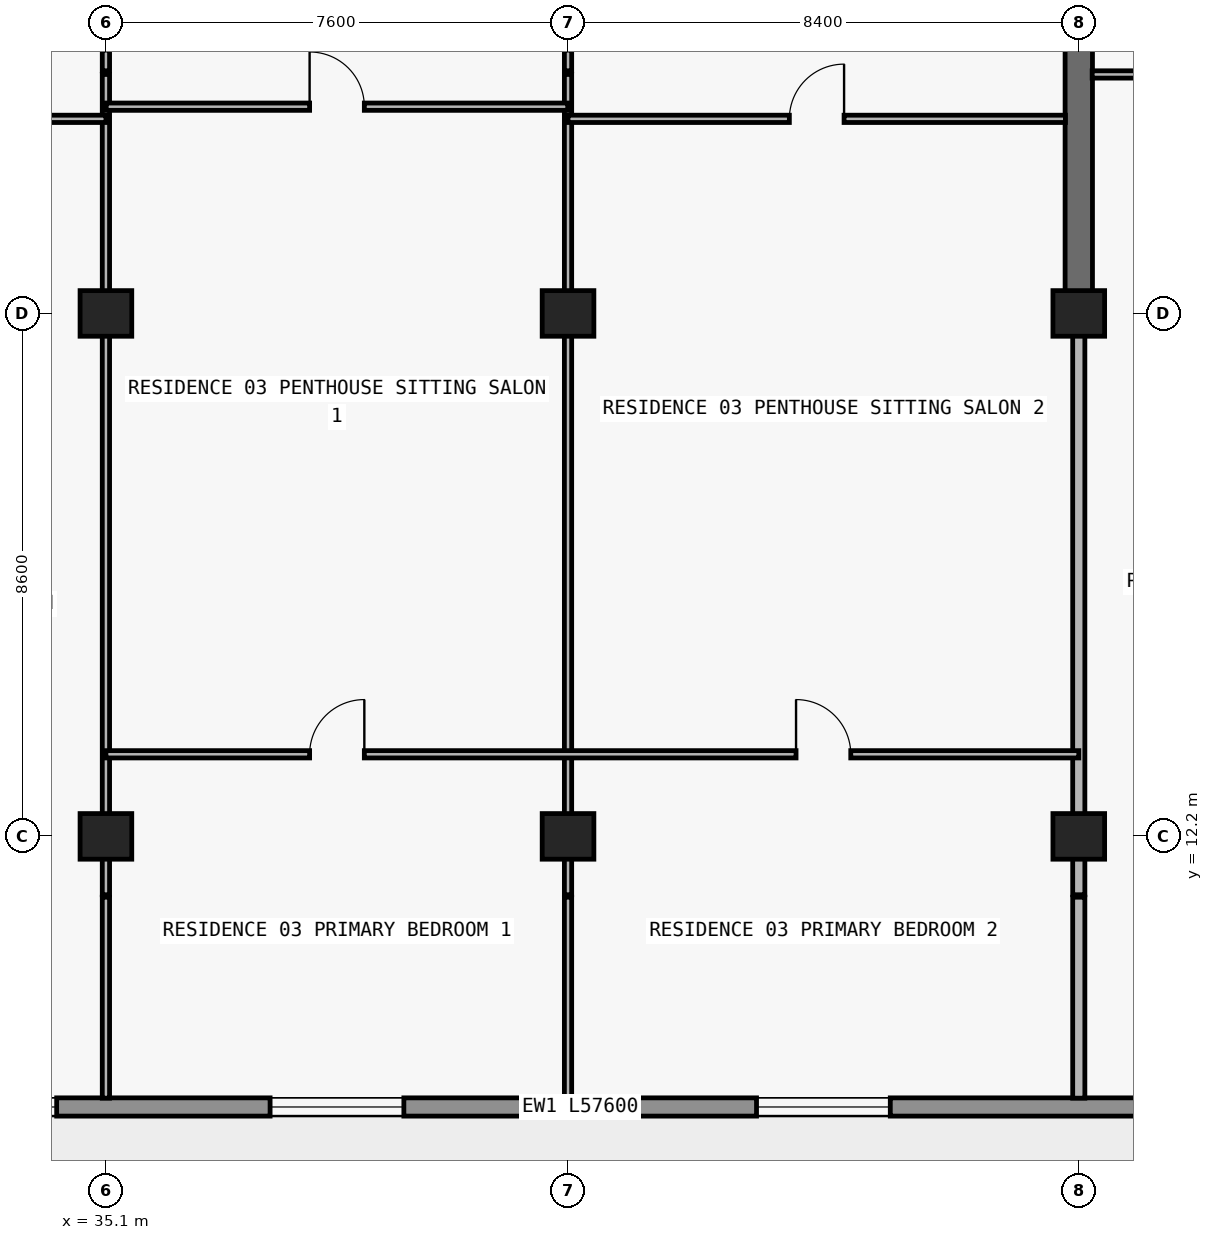
"""IFC4 building model, lengths in metres.
Left out: names, types, materials, properties, quantities, classifications, styles, units other than length and angle.
Written with IfcOpenShell. Run it as: python <this file> out.ifc"""

import sys

from ifc_helpers import new_model, si_unit, direction, frame, frame_2d, origin, origin_2d, place, context, subcontext, project, spatial, rectangle, extrude, element, fill, save


model = new_model("IFC4")
c1 = context("Model", 3, precision=1e-05, world=origin(), true_north=direction((0.0, 1.0)))
c2 = subcontext(c1, "Body", "Model", "MODEL_VIEW")
j1 = project(units=[si_unit("LENGTHUNIT", "METRE"), si_unit("PLANEANGLEUNIT", "RADIAN")], contexts=[c1])
p1 = place(None, origin())
s1 = spatial("IfcSite", under=j1, at=p1, CompositionType="ELEMENT")
p2 = place(p1, origin())
s2 = spatial("IfcBuilding", under=s1, at=p2, CompositionType="ELEMENT")
p3 = place(p2, frame((0.0, 0.0, 173.7)))
s3 = spatial("IfcBuildingStorey", under=s2, at=p3, CompositionType="ELEMENT", Elevation=173.7)
for number, where, z_axis, x_axis in (
    (1, (35.1, 12.2, 0.0), (0.0, 0.0, 1.0), (1.0, 0.0, 0.0)),
    (2, (42.7, 12.2, 0.0), (0.0, 0.0, 1.0), (1.0, 0.0, 0.0)),
    (3, (51.1, 12.2, 0.0), (0.0, 0.0, 1.0), (1.0, 0.0, 0.0)),
    (4, (35.1, 20.8, 0.0), (0.0, 0.0, 1.0), (1.0, 0.0, 0.0)),
    (5, (42.7, 20.8, 0.0), (0.0, 0.0, 1.0), (1.0, 0.0, 0.0)),
    (6, (51.1, 20.8, 0.0), (0.0, 0.0, 1.0), (1.0, 0.0, 0.0)),
):
    element("IfcColumn", number, at=place(p3, frame(where, z_axis=z_axis, x_axis=x_axis)), inside=s3, PredefinedType="COLUMN", context=c2, shape_type="SweptSolid", body=[
        extrude(rectangle(XDim=0.85, YDim=0.75, at=origin_2d()), origin(), (0.0, 0.0, 1.0), 3.05),
    ])
p4 = place(p3, frame((51.1, 20.8, 0.0), z_axis=(0.0, 0.0, 1.0), x_axis=(0.0, 1.0, 0.0)))
e7 = element("IfcWall", 7, at=p4, inside=s3, PredefinedType="SHEAR", context=c2, shape_type="SweptSolid", body=[
    extrude(rectangle(XDim=8.6, YDim=0.45, at=frame_2d((4.3, 0.0))), origin(), (0.0, 0.0, 1.0), 3.05),
])
p5 = place(p3, frame((67.7, 7.75, 0.0), z_axis=(0.0, 0.0, 1.0), x_axis=(-1.0, 0.0, 0.0)))
e8 = element("IfcWall", 8, at=p5, inside=s3, PredefinedType="STANDARD", context=c2, shape_type="SweptSolid", body=[
    extrude(rectangle(XDim=57.6, YDim=0.3, at=frame_2d((28.8, 0.0))), origin(), (0.0, 0.0, 1.0), 3.05),
])
p6 = place(p5, frame((54.673, 0.0, 0.0)))
e9 = element("IfcOpeningElement", 9, at=p6, cuts=e8, PredefinedType="OPENING", context=c2, shape_type="SweptSolid", body=[
    extrude(rectangle(XDim=2.0, YDim=2.3, at=frame_2d((1.0, 1.15))), frame((0.0, 0.16, 0.0), z_axis=(0.0, -1.0, 0.0), x_axis=(1.0, 0.0, 0.0)), (0.0, 0.0, 1.0), 0.32),
])
p7 = place(p5, frame((50.473, 0.0, 0.85)))
e10 = element("IfcOpeningElement", 10, at=p7, cuts=e8, PredefinedType="OPENING", context=c2, shape_type="SweptSolid", body=[
    extrude(rectangle(XDim=2.2, YDim=1.55, at=frame_2d((1.1, 0.775))), frame((0.0, 0.16, 0.0), z_axis=(0.0, -1.0, 0.0), x_axis=(1.0, 0.0, 0.0)), (0.0, 0.0, 1.0), 0.32),
])
p8 = place(p5, frame((46.09, 0.0, 0.0)))
e11 = element("IfcOpeningElement", 11, at=p8, cuts=e8, PredefinedType="OPENING", context=c2, shape_type="SweptSolid", body=[
    extrude(rectangle(XDim=2.0, YDim=2.3, at=frame_2d((1.0, 1.15))), frame((0.0, 0.16, 0.0), z_axis=(0.0, -1.0, 0.0), x_axis=(1.0, 0.0, 0.0)), (0.0, 0.0, 1.0), 0.32),
])
p9 = place(p5, frame((41.99, 0.0, 0.85)))
e12 = element("IfcOpeningElement", 12, at=p9, cuts=e8, PredefinedType="OPENING", context=c2, shape_type="SweptSolid", body=[
    extrude(rectangle(XDim=1.8, YDim=1.55, at=frame_2d((0.9, 0.775))), frame((0.0, 0.16, 0.0), z_axis=(0.0, -1.0, 0.0), x_axis=(1.0, 0.0, 0.0)), (0.0, 0.0, 1.0), 0.32),
])
p10 = place(p5, frame((38.09, 0.0, 0.0)))
e13 = element("IfcOpeningElement", 13, at=p10, cuts=e8, PredefinedType="OPENING", context=c2, shape_type="SweptSolid", body=[
    extrude(rectangle(XDim=2.0, YDim=2.3, at=frame_2d((1.0, 1.15))), frame((0.0, 0.16, 0.0), z_axis=(0.0, -1.0, 0.0), x_axis=(1.0, 0.0, 0.0)), (0.0, 0.0, 1.0), 0.32),
])
p11 = place(p5, frame((33.41, 0.0, 0.65)))
e14 = element("IfcOpeningElement", 14, at=p11, cuts=e8, PredefinedType="OPENING", context=c2, shape_type="SweptSolid", body=[
    extrude(rectangle(XDim=2.6, YDim=1.85, at=frame_2d((1.3, 0.925))), frame((0.0, 0.16, 0.0), z_axis=(0.0, -1.0, 0.0), x_axis=(1.0, 0.0, 0.0)), (0.0, 0.0, 1.0), 0.32),
])
p12 = place(p5, frame((27.7, 0.0, 0.85)))
e15 = element("IfcOpeningElement", 15, at=p12, cuts=e8, PredefinedType="OPENING", context=c2, shape_type="SweptSolid", body=[
    extrude(rectangle(XDim=2.2, YDim=1.55, at=frame_2d((1.1, 0.775))), frame((0.0, 0.16, 0.0), z_axis=(0.0, -1.0, 0.0), x_axis=(1.0, 0.0, 0.0)), (0.0, 0.0, 1.0), 0.32),
])
p13 = place(p5, frame((19.7, 0.0, 0.85)))
e16 = element("IfcOpeningElement", 16, at=p13, cuts=e8, PredefinedType="OPENING", context=c2, shape_type="SweptSolid", body=[
    extrude(rectangle(XDim=2.2, YDim=1.55, at=frame_2d((1.1, 0.775))), frame((0.0, 0.16, 0.0), z_axis=(0.0, -1.0, 0.0), x_axis=(1.0, 0.0, 0.0)), (0.0, 0.0, 1.0), 0.32),
])
p14 = place(p5, frame((13.29, 0.0, 0.0)))
e17 = element("IfcOpeningElement", 17, at=p14, cuts=e8, PredefinedType="OPENING", context=c2, shape_type="SweptSolid", body=[
    extrude(rectangle(XDim=2.0, YDim=2.3, at=frame_2d((1.0, 1.15))), frame((0.0, 0.16, 0.0), z_axis=(0.0, -1.0, 0.0), x_axis=(1.0, 0.0, 0.0)), (0.0, 0.0, 1.0), 0.32),
])
p15 = place(p5, frame((9.19, 0.0, 0.85)))
e18 = element("IfcOpeningElement", 18, at=p15, cuts=e8, PredefinedType="OPENING", context=c2, shape_type="SweptSolid", body=[
    extrude(rectangle(XDim=1.8, YDim=1.55, at=frame_2d((0.9, 0.775))), frame((0.0, 0.16, 0.0), z_axis=(0.0, -1.0, 0.0), x_axis=(1.0, 0.0, 0.0)), (0.0, 0.0, 1.0), 0.32),
])
p16 = place(p5, frame((5.273, 0.0, 0.0)))
e19 = element("IfcOpeningElement", 19, at=p16, cuts=e8, PredefinedType="OPENING", context=c2, shape_type="SweptSolid", body=[
    extrude(rectangle(XDim=2.0, YDim=2.3, at=frame_2d((1.0, 1.15))), frame((0.0, 0.16, 0.0), z_axis=(0.0, -1.0, 0.0), x_axis=(1.0, 0.0, 0.0)), (0.0, 0.0, 1.0), 0.32),
])
p17 = place(p5, frame((1.073, 0.0, 0.85)))
e20 = element("IfcOpeningElement", 20, at=p17, cuts=e8, PredefinedType="OPENING", context=c2, shape_type="SweptSolid", body=[
    extrude(rectangle(XDim=2.2, YDim=1.55, at=frame_2d((1.1, 0.775))), frame((0.0, 0.16, 0.0), z_axis=(0.0, -1.0, 0.0), x_axis=(1.0, 0.0, 0.0)), (0.0, 0.0, 1.0), 0.32),
])
p18 = place(p3, frame((35.1, 7.895, 0.0), z_axis=(0.0, 0.0, 1.0), x_axis=(0.0, 1.0, 0.0)))
e21 = element("IfcWall", 21, at=p18, inside=s3, PredefinedType="PARTITIONING", context=c2, shape_type="SweptSolid", body=[
    extrude(rectangle(XDim=3.305, YDim=0.12, at=frame_2d((1.652, 0.0))), origin(), (0.0, 0.0, 1.0), 3.05),
])
p19 = place(p3, frame((35.1, 11.24, 0.0), z_axis=(0.0, 0.0, 1.0), x_axis=(0.0, 1.0, 0.0)))
e22 = element("IfcWall", 22, at=p19, inside=s3, PredefinedType="PARTITIONING", context=c2, shape_type="SweptSolid", body=[
    extrude(rectangle(XDim=13.49, YDim=0.12, at=frame_2d((6.745, 0.0))), origin(), (0.0, 0.0, 1.0), 2.263),
])
p20 = place(p3, frame((35.1, 24.79, 0.0), z_axis=(0.0, 0.0, 1.0), x_axis=(0.0, 1.0, 0.0)))
e23 = element("IfcWall", 23, at=p20, inside=s3, PredefinedType="PARTITIONING", context=c2, shape_type="SweptSolid", body=[
    extrude(rectangle(XDim=0.34, YDim=0.12, at=frame_2d((0.17, 0.0))), origin(), (0.0, 0.0, 1.0), 2.263),
])
p21 = place(p3, frame((42.7, 7.895, 0.0), z_axis=(0.0, 0.0, 1.0), x_axis=(0.0, 1.0, 0.0)))
e24 = element("IfcWall", 24, at=p21, inside=s3, PredefinedType="PARTITIONING", context=c2, shape_type="SweptSolid", body=[
    extrude(rectangle(XDim=3.305, YDim=0.12, at=frame_2d((1.652, 0.0))), origin(), (0.0, 0.0, 1.0), 3.05),
])
p22 = place(p3, frame((42.7, 11.24, 0.0), z_axis=(0.0, 0.0, 1.0), x_axis=(0.0, 1.0, 0.0)))
e25 = element("IfcWall", 25, at=p22, inside=s3, PredefinedType="PARTITIONING", context=c2, shape_type="SweptSolid", body=[
    extrude(rectangle(XDim=13.49, YDim=0.12, at=frame_2d((6.745, 0.0))), origin(), (0.0, 0.0, 1.0), 2.263),
])
p23 = place(p3, frame((42.7, 24.79, 0.0), z_axis=(0.0, 0.0, 1.0), x_axis=(0.0, 1.0, 0.0)))
e26 = element("IfcWall", 26, at=p23, inside=s3, PredefinedType="PARTITIONING", context=c2, shape_type="SweptSolid", body=[
    extrude(rectangle(XDim=0.34, YDim=0.12, at=frame_2d((0.17, 0.0))), origin(), (0.0, 0.0, 1.0), 2.263),
])
p24 = place(p3, frame((51.1, 7.895, 0.0), z_axis=(0.0, 0.0, 1.0), x_axis=(0.0, 1.0, 0.0)))
e27 = element("IfcWall", 27, at=p24, inside=s3, PredefinedType="PARTITIONING", context=c2, shape_type="SweptSolid", body=[
    extrude(rectangle(XDim=3.305, YDim=0.2, at=frame_2d((1.652, 0.0))), origin(), (0.0, 0.0, 1.0), 3.05),
])
p25 = place(p3, frame((51.1, 11.24, 0.0), z_axis=(0.0, 0.0, 1.0), x_axis=(0.0, 1.0, 0.0)))
e28 = element("IfcWall", 28, at=p25, inside=s3, PredefinedType="PARTITIONING", context=c2, shape_type="SweptSolid", body=[
    extrude(rectangle(XDim=9.555, YDim=0.2, at=frame_2d((4.777, 0.0))), origin(), (0.0, 0.0, 1.0), 2.263),
])
p26 = place(p3, frame((35.1, 13.55, 0.0), z_axis=(0.0, 0.0, 1.0), x_axis=(1.0, 0.0, 0.0)))
e29 = element("IfcWall", 29, at=p26, inside=s3, PredefinedType="PARTITIONING", context=c2, shape_type="SweptSolid", body=[
    extrude(rectangle(XDim=16.0, YDim=0.12, at=frame_2d((8.0, 0.0))), origin(), (0.0, 0.0, 1.0), 3.05),
])
p27 = place(p26, frame((3.35, 0.0, 0.0)))
e30 = element("IfcOpeningElement", 30, at=p27, cuts=e29, PredefinedType="OPENING", context=c2, shape_type="SweptSolid", body=[
    extrude(rectangle(XDim=0.9, YDim=2.15, at=frame_2d((0.45, 1.075))), frame((0.0, 0.07, 0.0), z_axis=(0.0, -1.0, 0.0), x_axis=(1.0, 0.0, 0.0)), (0.0, 0.0, 1.0), 0.14),
])
p28 = place(p26, frame((11.35, 0.0, 0.0)))
e31 = element("IfcOpeningElement", 31, at=p28, cuts=e29, PredefinedType="OPENING", context=c2, shape_type="SweptSolid", body=[
    extrude(rectangle(XDim=0.9, YDim=2.15, at=frame_2d((0.45, 1.075))), frame((0.0, 0.07, 0.0), z_axis=(0.0, -1.0, 0.0), x_axis=(1.0, 0.0, 0.0)), (0.0, 0.0, 1.0), 0.14),
])
p29 = place(p3, frame((26.92, 24.0, 0.0), z_axis=(0.0, 0.0, 1.0), x_axis=(1.0, 0.0, 0.0)))
e32 = element("IfcWall", 32, at=p29, inside=s3, PredefinedType="PARTITIONING", context=c2, shape_type="SweptSolid", body=[
    extrude(rectangle(XDim=8.18, YDim=0.12, at=frame_2d((4.09, 0.0))), origin(), (0.0, 0.0, 1.0), 3.05),
])
p30 = place(p29, frame((1.33, 0.0, 0.0)))
e33 = element("IfcOpeningElement", 33, at=p30, cuts=e32, PredefinedType="OPENING", context=c2, shape_type="SweptSolid", body=[
    extrude(rectangle(XDim=0.9, YDim=2.15, at=frame_2d((0.45, 1.075))), frame((0.0, 0.07, 0.0), z_axis=(0.0, -1.0, 0.0), x_axis=(1.0, 0.0, 0.0)), (0.0, 0.0, 1.0), 0.14),
])
p31 = place(p3, frame((42.7, 24.0, 0.0), z_axis=(0.0, 0.0, 1.0), x_axis=(1.0, 0.0, 0.0)))
e34 = element("IfcWall", 34, at=p31, inside=s3, PredefinedType="PARTITIONING", context=c2, shape_type="SweptSolid", body=[
    extrude(rectangle(XDim=8.18, YDim=0.12, at=frame_2d((4.09, 0.0))), origin(), (0.0, 0.0, 1.0), 3.05),
])
p32 = place(p31, frame((3.64, 0.0, 0.0)))
e35 = element("IfcOpeningElement", 35, at=p32, cuts=e34, PredefinedType="OPENING", context=c2, shape_type="SweptSolid", body=[
    extrude(rectangle(XDim=0.9, YDim=2.15, at=frame_2d((0.45, 1.075))), frame((0.0, 0.07, 0.0), z_axis=(0.0, -1.0, 0.0), x_axis=(1.0, 0.0, 0.0)), (0.0, 0.0, 1.0), 0.14),
])
p33 = place(p3, frame((35.105, 24.2, 0.0), z_axis=(0.0, 0.0, 1.0), x_axis=(1.0, 0.0, 0.0)))
e36 = element("IfcWall", 36, at=p33, inside=s3, PredefinedType="PARTITIONING", context=c2, shape_type="SweptSolid", body=[
    extrude(rectangle(XDim=7.59, YDim=0.12, at=frame_2d((3.795, 0.0))), origin(), (0.0, 0.0, 1.0), 3.05),
])
p34 = place(p33, frame((3.345, 0.0, 0.0)))
e37 = element("IfcOpeningElement", 37, at=p34, cuts=e36, PredefinedType="OPENING", context=c2, shape_type="SweptSolid", body=[
    extrude(rectangle(XDim=0.9, YDim=2.15, at=frame_2d((0.45, 1.075))), frame((0.0, 0.07, 0.0), z_axis=(0.0, -1.0, 0.0), x_axis=(1.0, 0.0, 0.0)), (0.0, 0.0, 1.0), 0.14),
])
p35 = place(p3, frame((51.32, 24.73, 0.0), z_axis=(0.0, 0.0, 1.0), x_axis=(1.0, 0.0, 0.0)))
e38 = element("IfcWall", 38, at=p35, inside=s3, PredefinedType="PARTITIONING", context=c2, shape_type="SweptSolid", body=[
    extrude(rectangle(XDim=8.18, YDim=0.12, at=frame_2d((4.09, 0.0))), origin(), (0.0, 0.0, 1.0), 3.05),
])
p36 = place(p35, frame((1.583, 0.0, 0.0)))
e39 = element("IfcOpeningElement", 39, at=p36, cuts=e38, PredefinedType="OPENING", context=c2, shape_type="SweptSolid", body=[
    extrude(rectangle(XDim=0.9, YDim=2.15, at=frame_2d((0.45, 1.075))), frame((0.0, 0.07, 0.0), z_axis=(0.0, -1.0, 0.0), x_axis=(1.0, 0.0, 0.0)), (0.0, 0.0, 1.0), 0.14),
])
p37 = place(p35, frame((5.84, 0.0, 0.0)))
e40 = element("IfcOpeningElement", 40, at=p37, cuts=e38, PredefinedType="OPENING", context=c2, shape_type="SweptSolid", body=[
    extrude(rectangle(XDim=0.9, YDim=2.15, at=frame_2d((0.45, 1.075))), frame((0.0, 0.07, 0.0), z_axis=(0.0, -1.0, 0.0), x_axis=(1.0, 0.0, 0.0)), (0.0, 0.0, 1.0), 0.14),
])
p38 = place(p11, origin())
e41 = element("IfcWindow", 41, at=p38, inside=s3, PartitioningType="SINGLE_PANEL", PredefinedType="WINDOW", context=c2, shape_type="SweptSolid", body=[
    extrude(rectangle(XDim=2.6, YDim=1.85, at=frame_2d((1.3, 0.925))), frame((0.0, 0.03, 0.0), z_axis=(0.0, -1.0, 0.0), x_axis=(1.0, 0.0, 0.0)), (0.0, 0.0, 1.0), 0.06),
])
fill(e14, e41)
p39 = place(p12, origin())
e42 = element("IfcWindow", 42, at=p39, inside=s3, PartitioningType="SINGLE_PANEL", PredefinedType="WINDOW", context=c2, shape_type="SweptSolid", body=[
    extrude(rectangle(XDim=2.2, YDim=1.55, at=frame_2d((1.1, 0.775))), frame((0.0, 0.03, 0.0), z_axis=(0.0, -1.0, 0.0), x_axis=(1.0, 0.0, 0.0)), (0.0, 0.0, 1.0), 0.06),
])
fill(e15, e42)
p40 = place(p13, origin())
e43 = element("IfcWindow", 43, at=p40, inside=s3, PartitioningType="SINGLE_PANEL", PredefinedType="WINDOW", context=c2, shape_type="SweptSolid", body=[
    extrude(rectangle(XDim=2.2, YDim=1.55, at=frame_2d((1.1, 0.775))), frame((0.0, 0.03, 0.0), z_axis=(0.0, -1.0, 0.0), x_axis=(1.0, 0.0, 0.0)), (0.0, 0.0, 1.0), 0.06),
])
fill(e16, e43)
p41 = place(p34, origin())
e44 = element("IfcDoor", 44, at=p41, inside=s3, OperationType="SINGLE_SWING_LEFT", PredefinedType="DOOR", context=c2, shape_type="SweptSolid", body=[
    extrude(rectangle(XDim=0.9, YDim=2.15, at=frame_2d((0.45, 1.075))), frame((0.0, 0.025, 0.0), z_axis=(0.0, -1.0, 0.0), x_axis=(1.0, 0.0, 0.0)), (0.0, 0.0, 1.0), 0.05),
])
fill(e37, e44)
p42 = place(p27, origin())
e45 = element("IfcDoor", 45, at=p42, inside=s3, OperationType="SINGLE_SWING_RIGHT", PredefinedType="DOOR", context=c2, shape_type="SweptSolid", body=[
    extrude(rectangle(XDim=0.9, YDim=2.15, at=frame_2d((0.45, 1.075))), frame((0.0, 0.025, 0.0), z_axis=(0.0, -1.0, 0.0), x_axis=(1.0, 0.0, 0.0)), (0.0, 0.0, 1.0), 0.05),
])
fill(e30, e45)
p43 = place(p32, origin())
e46 = element("IfcDoor", 46, at=p43, inside=s3, OperationType="SINGLE_SWING_RIGHT", PredefinedType="DOOR", context=c2, shape_type="SweptSolid", body=[
    extrude(rectangle(XDim=0.9, YDim=2.15, at=frame_2d((0.45, 1.075))), frame((0.0, 0.025, 0.0), z_axis=(0.0, -1.0, 0.0), x_axis=(1.0, 0.0, 0.0)), (0.0, 0.0, 1.0), 0.05),
])
fill(e35, e46)
p44 = place(p28, origin())
e47 = element("IfcDoor", 47, at=p44, inside=s3, OperationType="SINGLE_SWING_LEFT", PredefinedType="DOOR", context=c2, shape_type="SweptSolid", body=[
    extrude(rectangle(XDim=0.9, YDim=2.15, at=frame_2d((0.45, 1.075))), frame((0.0, 0.025, 0.0), z_axis=(0.0, -1.0, 0.0), x_axis=(1.0, 0.0, 0.0)), (0.0, 0.0, 1.0), 0.05),
])
fill(e31, e47)
save(model, sys.argv[1])
